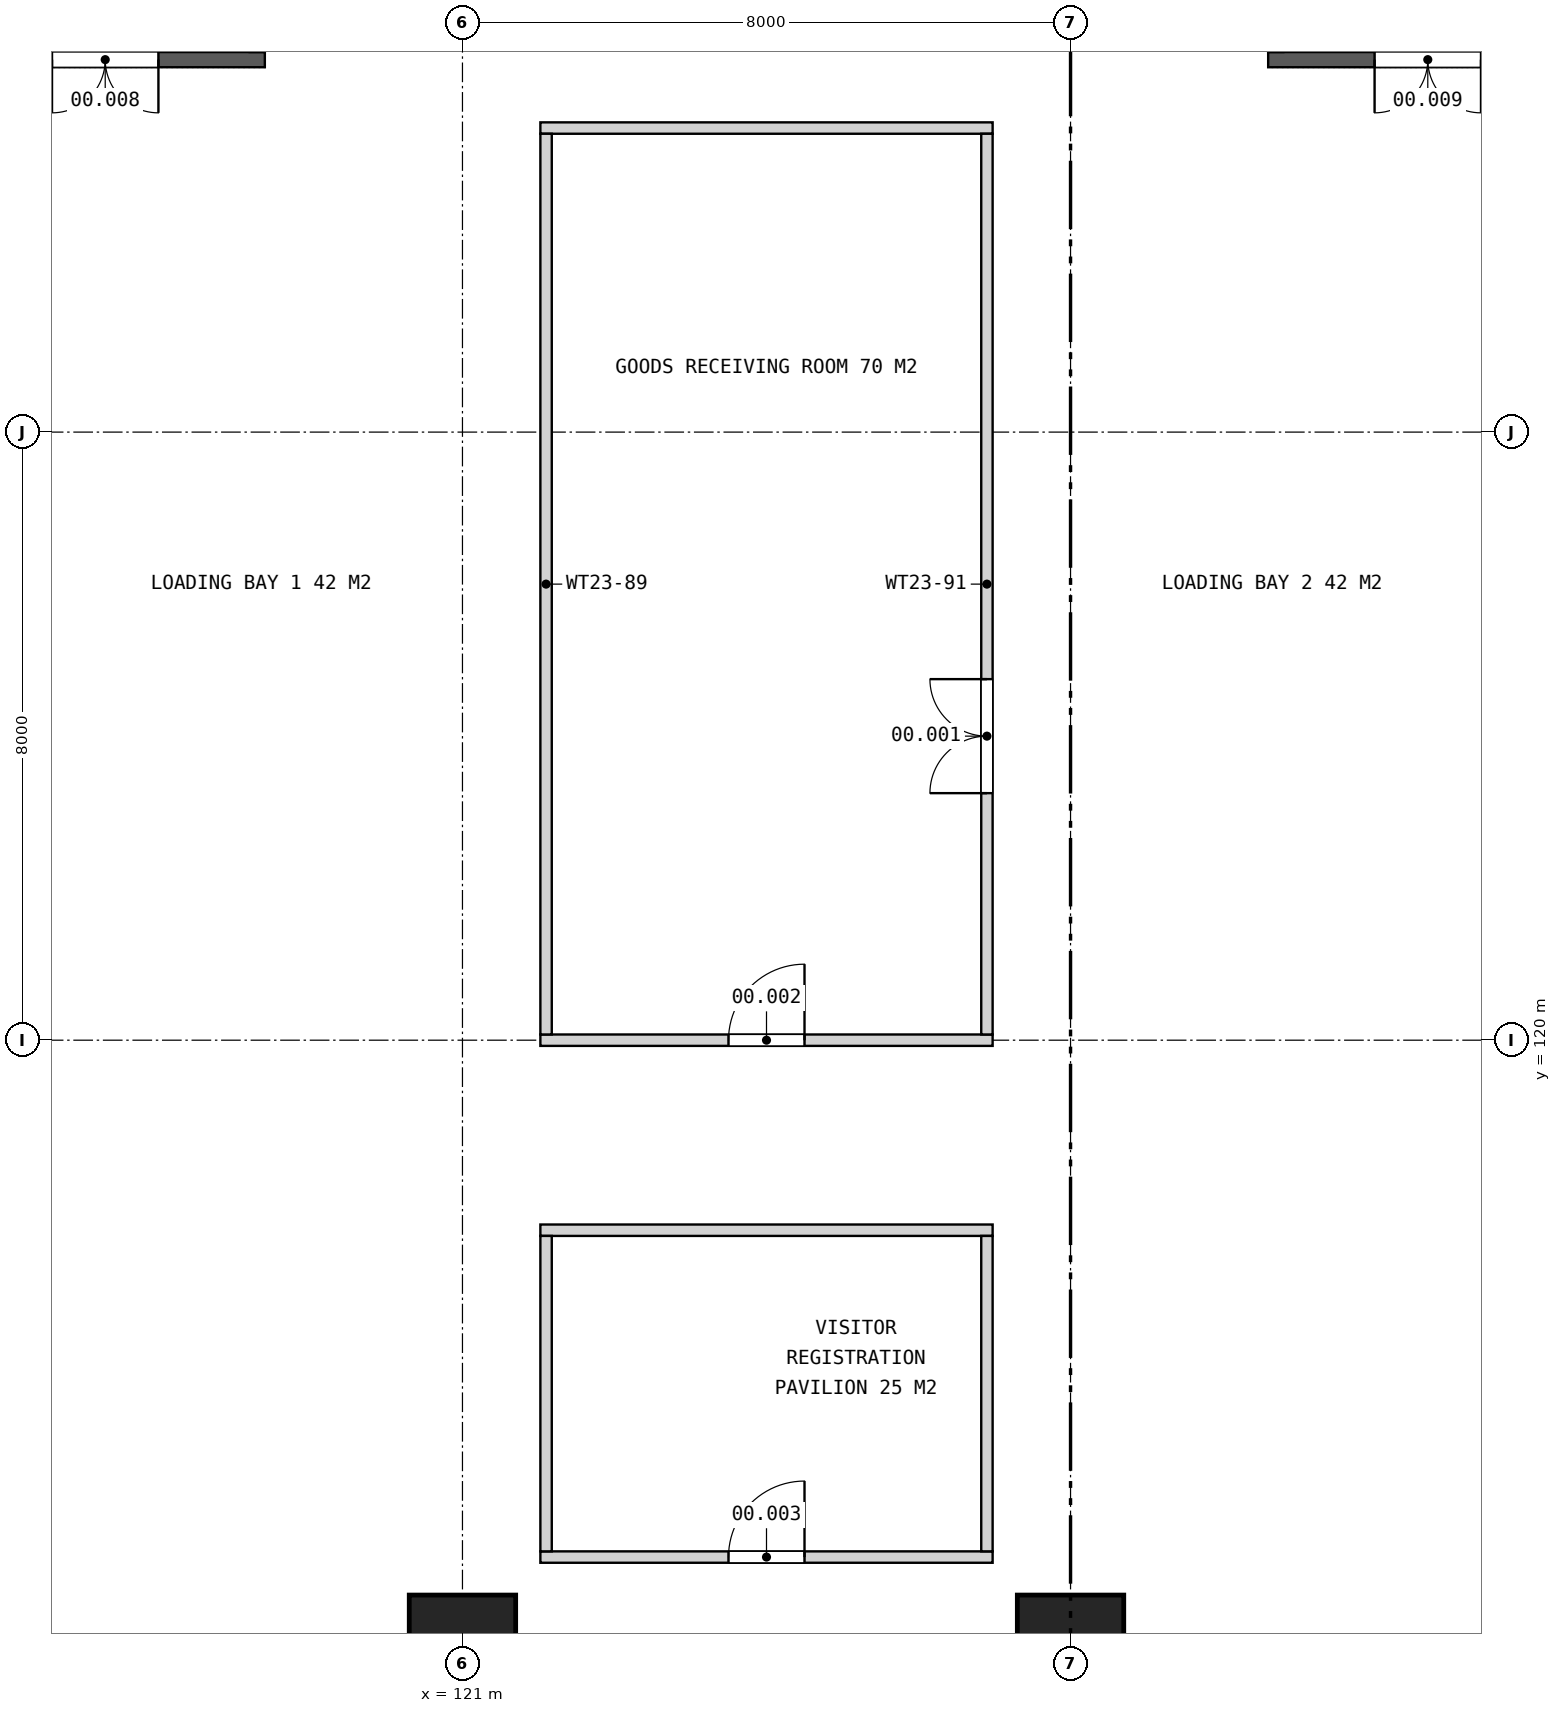
"""IFC4 building model, lengths in metres.
Left out: names, types, materials, properties, quantities, classifications, styles, units other than length and angle.
Written with IfcOpenShell. Run it as: python <this file> out.ifc"""

import sys

from ifc_helpers import new_model, si_unit, direction, frame, frame_2d, origin, origin_2d, place, context, subcontext, project, spatial, rectangle, circle, extrude, element, fill, save


model = new_model("IFC4")
c1 = context("Model", 3, precision=1e-05, world=origin(), true_north=direction((0.0, 1.0)))
c2 = subcontext(c1, "Body", "Model", "MODEL_VIEW")
j1 = project(units=[si_unit("LENGTHUNIT", "METRE"), si_unit("PLANEANGLEUNIT", "RADIAN")], contexts=[c1])
p1 = place(None, origin())
s1 = spatial("IfcSite", under=j1, at=p1, CompositionType="ELEMENT")
p2 = place(p1, origin())
s2 = spatial("IfcBuilding", under=s1, at=p2, CompositionType="ELEMENT")
p3 = place(p2, origin())
s3 = spatial("IfcBuildingStorey", under=s2, at=p3, CompositionType="ELEMENT", Elevation=0.0)
for number, where, z_axis, x_axis in (
    (1, (121.0, 112.0, -0.4), (0.0, 0.0, 1.0), (1.0, 0.0, 0.0)),
    (2, (129.0, 112.0, -0.4), (0.0, 0.0, 1.0), (1.0, 0.0, 0.0)),
):
    element("IfcColumn", number, at=place(p3, frame(where, z_axis=z_axis, x_axis=x_axis)), inside=s3, PredefinedType="COLUMN", context=c2, shape_type="SweptSolid", body=[
        extrude(circle(Radius=0.7, at=origin_2d()), origin(), (0.0, 0.0, 1.0), 10.4),
    ])
p4 = place(p3, frame((122.025, 113.2, -0.4), z_axis=(0.0, 0.0, 1.0), x_axis=(1.0, 0.0, 0.0)))
e3 = element("IfcWall", 3, at=p4, inside=s3, PredefinedType="PARTITIONING", context=c2, shape_type="SweptSolid", body=[
    extrude(rectangle(XDim=5.95, YDim=0.15, at=frame_2d((2.975, 0.0))), origin(), (0.0, 0.0, 1.0), 9.54),
])
p5 = place(p4, frame((2.475, 0.0, 0.4)))
e4 = element("IfcOpeningElement", 4, at=p5, cuts=e3, PredefinedType="OPENING", context=c2, shape_type="SweptSolid", body=[
    extrude(rectangle(XDim=1.0, YDim=2.1, at=frame_2d((0.5, 1.05))), frame((0.0, 0.085, 0.0), z_axis=(0.0, -1.0, 0.0), x_axis=(1.0, 0.0, 0.0)), (0.0, 0.0, 1.0), 0.17),
])
p6 = place(p3, frame((122.025, 117.5, 0.0), z_axis=(0.0, 0.0, 1.0), x_axis=(1.0, 0.0, 0.0)))
e5 = element("IfcWall", 5, at=p6, inside=s3, PredefinedType="PARTITIONING", context=c2, shape_type="SweptSolid", body=[
    extrude(rectangle(XDim=5.95, YDim=0.15, at=frame_2d((2.975, 0.0))), origin(), (0.0, 0.0, 1.0), 9.14),
])
p7 = place(p3, frame((122.025, 120.0, 0.0), z_axis=(0.0, 0.0, 1.0), x_axis=(1.0, 0.0, 0.0)))
e6 = element("IfcWall", 6, at=p7, inside=s3, PredefinedType="PARTITIONING", context=c2, shape_type="SweptSolid", body=[
    extrude(rectangle(XDim=5.95, YDim=0.15, at=frame_2d((2.975, 0.0))), origin(), (0.0, 0.0, 1.0), 8.1),
])
p8 = place(p7, frame((2.475, 0.0, 0.0)))
e7 = element("IfcOpeningElement", 7, at=p8, cuts=e6, PredefinedType="OPENING", context=c2, shape_type="SweptSolid", body=[
    extrude(rectangle(XDim=1.0, YDim=2.1, at=frame_2d((0.5, 1.05))), frame((0.0, 0.085, 0.0), z_axis=(0.0, -1.0, 0.0), x_axis=(1.0, 0.0, 0.0)), (0.0, 0.0, 1.0), 0.17),
])
p9 = place(p3, frame((122.025, 132.0, 0.0), z_axis=(0.0, 0.0, 1.0), x_axis=(1.0, 0.0, 0.0)))
e8 = element("IfcWall", 8, at=p9, inside=s3, PredefinedType="PARTITIONING", context=c2, shape_type="SweptSolid", body=[
    extrude(rectangle(XDim=5.95, YDim=0.15, at=frame_2d((2.975, 0.0))), origin(), (0.0, 0.0, 1.0), 9.14),
])
p10 = place(p3, frame((114.2, 132.9, 0.0), z_axis=(0.0, 0.0, 1.0), x_axis=(1.0, 0.0, 0.0)))
e9 = element("IfcWall", 9, at=p10, inside=s3, PredefinedType="SOLIDWALL", context=c2, shape_type="SweptSolid", body=[
    extrude(rectangle(XDim=4.2, YDim=0.2, at=frame_2d((2.1, 0.0))), origin(), (0.0, 0.0, 1.0), 10.0),
])
p11 = place(p10, frame((1.4, 0.0, 0.0)))
e10 = element("IfcOpeningElement", 10, at=p11, cuts=e9, PredefinedType="OPENING", context=c2, shape_type="SweptSolid", body=[
    extrude(rectangle(XDim=1.4, YDim=2.2, at=frame_2d((0.7, 1.1))), frame((0.0, 0.11, 0.0), z_axis=(0.0, -1.0, 0.0), x_axis=(1.0, 0.0, 0.0)), (0.0, 0.0, 1.0), 0.22),
])
p12 = place(p3, frame((131.6, 132.9, 0.0), z_axis=(0.0, 0.0, 1.0), x_axis=(1.0, 0.0, 0.0)))
e11 = element("IfcWall", 11, at=p12, inside=s3, PredefinedType="SOLIDWALL", context=c2, shape_type="SweptSolid", body=[
    extrude(rectangle(XDim=4.2, YDim=0.2, at=frame_2d((2.1, 0.0))), origin(), (0.0, 0.0, 1.0), 10.0),
])
p13 = place(p12, frame((1.4, 0.0, 0.0)))
e12 = element("IfcOpeningElement", 12, at=p13, cuts=e11, PredefinedType="OPENING", context=c2, shape_type="SweptSolid", body=[
    extrude(rectangle(XDim=1.4, YDim=2.2, at=frame_2d((0.7, 1.1))), frame((0.0, 0.11, 0.0), z_axis=(0.0, -1.0, 0.0), x_axis=(1.0, 0.0, 0.0)), (0.0, 0.0, 1.0), 0.22),
])
p14 = place(p3, frame((122.1, 113.275, -0.4), z_axis=(0.0, 0.0, 1.0), x_axis=(0.0, 1.0, 0.0)))
e13 = element("IfcWall", 13, at=p14, inside=s3, PredefinedType="PARTITIONING", context=c2, shape_type="SweptSolid", body=[
    extrude(rectangle(XDim=4.15, YDim=0.15, at=frame_2d((2.075, 0.0))), origin(), (0.0, 0.0, 1.0), 10.4),
])
p15 = place(p3, frame((122.1, 120.075, 0.0), z_axis=(0.0, 0.0, 1.0), x_axis=(0.0, 1.0, 0.0)))
e14 = element("IfcWall", 14, at=p15, inside=s3, PredefinedType="PARTITIONING", context=c2, shape_type="SweptSolid", body=[
    extrude(rectangle(XDim=11.85, YDim=0.15, at=frame_2d((5.925, 0.0))), origin(), (0.0, 0.0, 1.0), 8.1),
])
p16 = place(p3, frame((127.9, 113.275, -0.4), z_axis=(0.0, 0.0, 1.0), x_axis=(0.0, 1.0, 0.0)))
e15 = element("IfcWall", 15, at=p16, inside=s3, PredefinedType="PARTITIONING", context=c2, shape_type="SweptSolid", body=[
    extrude(rectangle(XDim=4.15, YDim=0.15, at=frame_2d((2.075, 0.0))), origin(), (0.0, 0.0, 1.0), 10.4),
])
p17 = place(p3, frame((127.9, 120.075, 0.0), z_axis=(0.0, 0.0, 1.0), x_axis=(0.0, 1.0, 0.0)))
e16 = element("IfcWall", 16, at=p17, inside=s3, PredefinedType="PARTITIONING", context=c2, shape_type="SweptSolid", body=[
    extrude(rectangle(XDim=11.85, YDim=0.15, at=frame_2d((5.925, 0.0))), origin(), (0.0, 0.0, 1.0), 8.1),
])
p18 = place(p17, frame((3.175, 0.0, 0.0)))
e17 = element("IfcOpeningElement", 17, at=p18, cuts=e16, PredefinedType="OPENING", context=c2, shape_type="SweptSolid", body=[
    extrude(rectangle(XDim=1.5, YDim=2.4, at=frame_2d((0.75, 1.2))), frame((0.0, 0.085, 0.0), z_axis=(0.0, -1.0, 0.0), x_axis=(1.0, 0.0, 0.0)), (0.0, 0.0, 1.0), 0.17),
])
p19 = place(p18, origin())
e18 = element("IfcDoor", 18, at=p19, inside=s3, OperationType="DOUBLE_DOOR_SINGLE_SWING", PredefinedType="DOOR", context=c2, shape_type="SweptSolid", body=[
    extrude(rectangle(XDim=1.5, YDim=2.4, at=frame_2d((0.75, 1.2))), frame((0.0, 0.025, 0.0), z_axis=(0.0, -1.0, 0.0), x_axis=(1.0, 0.0, 0.0)), (0.0, 0.0, 1.0), 0.05),
])
fill(e17, e18)
p20 = place(p8, origin())
e19 = element("IfcDoor", 19, at=p20, inside=s3, OperationType="SINGLE_SWING_RIGHT", PredefinedType="DOOR", context=c2, shape_type="SweptSolid", body=[
    extrude(rectangle(XDim=1.0, YDim=2.1, at=frame_2d((0.5, 1.05))), frame((0.0, 0.025, 0.0), z_axis=(0.0, -1.0, 0.0), x_axis=(1.0, 0.0, 0.0)), (0.0, 0.0, 1.0), 0.05),
])
fill(e7, e19)
p21 = place(p5, origin())
e20 = element("IfcDoor", 20, at=p21, inside=s3, OperationType="SINGLE_SWING_RIGHT", PredefinedType="DOOR", context=c2, shape_type="SweptSolid", body=[
    extrude(rectangle(XDim=1.0, YDim=2.1, at=frame_2d((0.5, 1.05))), frame((0.0, 0.025, 0.0), z_axis=(0.0, -1.0, 0.0), x_axis=(1.0, 0.0, 0.0)), (0.0, 0.0, 1.0), 0.05),
])
fill(e4, e20)
p22 = place(p11, frame((1.4, 0.0, 0.0), z_axis=(0.0, 0.0, 1.0), x_axis=(-1.0, 0.0, 0.0)))
e21 = element("IfcDoor", 21, at=p22, inside=s3, OperationType="DOUBLE_DOOR_SINGLE_SWING", PredefinedType="DOOR", context=c2, shape_type="SweptSolid", body=[
    extrude(rectangle(XDim=1.4, YDim=2.2, at=frame_2d((0.7, 1.1))), frame((0.0, 0.025, 0.0), z_axis=(0.0, -1.0, 0.0), x_axis=(1.0, 0.0, 0.0)), (0.0, 0.0, 1.0), 0.05),
])
fill(e10, e21)
p23 = place(p13, frame((1.4, 0.0, 0.0), z_axis=(0.0, 0.0, 1.0), x_axis=(-1.0, 0.0, 0.0)))
e22 = element("IfcDoor", 22, at=p23, inside=s3, OperationType="DOUBLE_DOOR_SINGLE_SWING", PredefinedType="DOOR", context=c2, shape_type="SweptSolid", body=[
    extrude(rectangle(XDim=1.4, YDim=2.2, at=frame_2d((0.7, 1.1))), frame((0.0, 0.025, 0.0), z_axis=(0.0, -1.0, 0.0), x_axis=(1.0, 0.0, 0.0)), (0.0, 0.0, 1.0), 0.05),
])
fill(e12, e22)
save(model, sys.argv[1])
